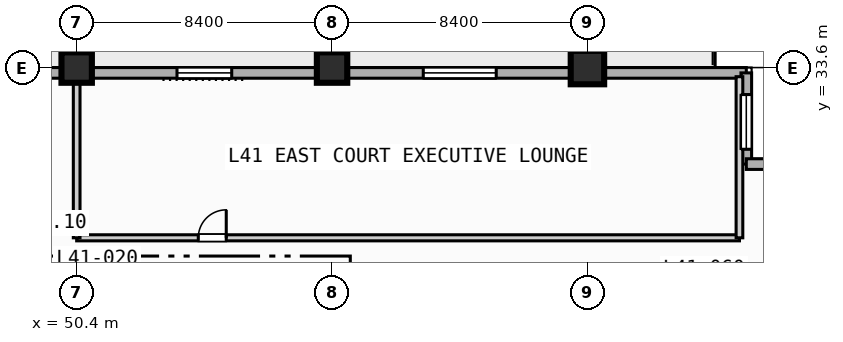
"""IFC4 building model, lengths in metres.
Left out: names, types, materials, properties, quantities, classifications, styles, units other than length and angle.
Written with IfcOpenShell. Run it as: python <this file> out.ifc"""

import sys

from ifc_helpers import new_model, si_unit, direction, frame, frame_2d, origin, origin_2d, place, context, subcontext, project, spatial, rectangle, extrude, element, fill, save


model = new_model("IFC4")
c1 = context("Model", 3, precision=1e-05, world=origin(), true_north=direction((0.0, 1.0)))
c2 = subcontext(c1, "Body", "Model", "MODEL_VIEW")
j1 = project(units=[si_unit("LENGTHUNIT", "METRE"), si_unit("PLANEANGLEUNIT", "RADIAN")], contexts=[c1])
p1 = place(None, origin())
s1 = spatial("IfcSite", under=j1, at=p1, CompositionType="ELEMENT")
p2 = place(p1, origin())
s2 = spatial("IfcBuilding", under=s1, at=p2, CompositionType="ELEMENT")
p3 = place(p2, frame((0.0, 0.0, 171.7)))
s3 = spatial("IfcBuildingStorey", under=s2, at=p3, CompositionType="ELEMENT", Elevation=171.7)
for number, where, z_axis, x_axis in (
    (1, (50.4, 33.6, 0.0), (0.0, 0.0, 1.0), (1.0, 0.0, 0.0)),
    (2, (58.8, 33.6, 0.0), (0.0, 0.0, 1.0), (1.0, 0.0, 0.0)),
):
    element("IfcColumn", number, at=place(p3, frame(where, z_axis=z_axis, x_axis=x_axis)), inside=s3, PredefinedType="COLUMN", context=c2, shape_type="SweptSolid", body=[
        extrude(rectangle(XDim=1.0, YDim=1.0, at=origin_2d()), origin(), (0.0, 0.0, 1.0), 3.7),
    ])
p4 = place(p3, frame((67.2, 33.6, 0.0), z_axis=(0.0, 0.0, 1.0), x_axis=(1.0, 0.0, 0.0)))
e3 = element("IfcColumn", 3, at=p4, inside=s3, PredefinedType="COLUMN", context=c2, shape_type="SweptSolid", body=[
    extrude(rectangle(XDim=1.1, YDim=1.1, at=origin_2d()), origin(), (0.0, 0.0, 1.0), 3.7),
])
p5 = place(p3, frame((33.425, 33.425, 0.0), z_axis=(0.0, 0.0, 1.0), x_axis=(1.0, 0.0, 0.0)))
e4 = element("IfcWall", 4, at=p5, inside=s3, PredefinedType="STANDARD", context=c2, shape_type="SweptSolid", body=[
    extrude(rectangle(XDim=39.0, YDim=0.35, at=frame_2d((19.5, 0.0))), origin(), (0.0, 0.0, 1.0), 3.47),
])
p6 = place(p5, frame((12.075, 0.0, 0.0)))
e5 = element("IfcOpeningElement", 5, at=p6, cuts=e4, PredefinedType="OPENING", context=c2, shape_type="SweptSolid", body=[
    extrude(rectangle(XDim=1.4, YDim=2.2, at=frame_2d((0.7, 1.1))), frame((0.0, 0.185, 0.0), z_axis=(0.0, -1.0, 0.0), x_axis=(1.0, 0.0, 0.0)), (0.0, 0.0, 1.0), 0.37),
])
p7 = place(p5, frame((20.275, 0.0, 0.85)))
e6 = element("IfcOpeningElement", 6, at=p7, cuts=e4, PredefinedType="OPENING", context=c2, shape_type="SweptSolid", body=[
    extrude(rectangle(XDim=1.8, YDim=1.8, at=frame_2d((0.9, 0.9))), frame((0.0, 0.185, 0.0), z_axis=(0.0, -1.0, 0.0), x_axis=(1.0, 0.0, 0.0)), (0.0, 0.0, 1.0), 0.37),
])
p8 = place(p5, frame((28.375, 0.0, 0.85)))
e7 = element("IfcOpeningElement", 7, at=p8, cuts=e4, PredefinedType="OPENING", context=c2, shape_type="SweptSolid", body=[
    extrude(rectangle(XDim=2.4, YDim=1.95, at=frame_2d((1.2, 0.975))), frame((0.0, 0.185, 0.0), z_axis=(0.0, -1.0, 0.0), x_axis=(1.0, 0.0, 0.0)), (0.0, 0.0, 1.0), 0.37),
])
p9 = place(p3, frame((72.425, 33.425, 0.0), z_axis=(0.0, 0.0, 1.0), x_axis=(0.0, -1.0, 0.0)))
e8 = element("IfcWall", 8, at=p9, inside=s3, PredefinedType="STANDARD", context=c2, shape_type="SweptSolid", body=[
    extrude(rectangle(XDim=3.0, YDim=0.35, at=frame_2d((1.5, 0.0))), origin(), (0.0, 0.0, 1.0), 3.47),
])
p10 = place(p9, frame((0.712, 0.0, 0.85)))
e9 = element("IfcOpeningElement", 9, at=p10, cuts=e8, PredefinedType="OPENING", context=c2, shape_type="SweptSolid", body=[
    extrude(rectangle(XDim=1.8, YDim=1.8, at=frame_2d((0.9, 0.9))), frame((0.0, 0.185, 0.0), z_axis=(0.0, -1.0, 0.0), x_axis=(1.0, 0.0, 0.0)), (0.0, 0.0, 1.0), 0.37),
])
p11 = place(p3, frame((72.425, 30.425, 0.0), z_axis=(0.0, 0.0, 1.0), x_axis=(1.0, 0.0, 0.0)))
e10 = element("IfcWall", 10, at=p11, inside=s3, PredefinedType="STANDARD", context=c2, shape_type="SweptSolid", body=[
    extrude(rectangle(XDim=3.0, YDim=0.35, at=frame_2d((1.5, 0.0))), origin(), (0.0, 0.0, 1.0), 3.47),
])
p12 = place(p3, frame((50.4, 28.0, 0.0), z_axis=(0.0, 0.0, 1.0), x_axis=(1.0, 0.0, 0.0)))
e11 = element("IfcWall", 11, at=p12, inside=s3, PredefinedType="PARTITIONING", context=c2, shape_type="SweptSolid", body=[
    extrude(rectangle(XDim=21.8, YDim=0.2, at=frame_2d((10.9, 0.0))), origin(), (0.0, 0.0, 1.0), 3.47),
])
p13 = place(p12, frame((4.0, 0.0, 0.0)))
e12 = element("IfcOpeningElement", 12, at=p13, cuts=e11, PredefinedType="OPENING", context=c2, shape_type="SweptSolid", body=[
    extrude(rectangle(XDim=0.92, YDim=2.1, at=frame_2d((0.46, 1.05))), frame((0.0, 0.11, 0.0), z_axis=(0.0, -1.0, 0.0), x_axis=(1.0, 0.0, 0.0)), (0.0, 0.0, 1.0), 0.22),
])
p14 = place(p3, frame((50.4, 28.0, 0.0), z_axis=(0.0, 0.0, 1.0), x_axis=(0.0, 1.0, 0.0)))
e13 = element("IfcWall", 13, at=p14, inside=s3, PredefinedType="PARTITIONING", context=c2, shape_type="SweptSolid", body=[
    extrude(rectangle(XDim=5.3, YDim=0.22, at=frame_2d((2.65, 0.0))), origin(), (0.0, 0.0, 1.0), 3.007),
])
p15 = place(p3, frame((72.2, 28.0, 0.0), z_axis=(0.0, 0.0, 1.0), x_axis=(0.0, 1.0, 0.0)))
e14 = element("IfcWall", 14, at=p15, inside=s3, PredefinedType="PARTITIONING", context=c2, shape_type="SweptSolid", body=[
    extrude(rectangle(XDim=5.3, YDim=0.22, at=frame_2d((2.65, 0.0))), origin(), (0.0, 0.0, 1.0), 3.47),
])
p16 = place(p7, origin())
e15 = element("IfcWindow", 15, at=p16, inside=s3, PartitioningType="SINGLE_PANEL", PredefinedType="WINDOW", context=c2, shape_type="SweptSolid", body=[
    extrude(rectangle(XDim=1.8, YDim=1.8, at=frame_2d((0.9, 0.9))), frame((0.0, 0.03, 0.0), z_axis=(0.0, -1.0, 0.0), x_axis=(1.0, 0.0, 0.0)), (0.0, 0.0, 1.0), 0.06),
])
fill(e6, e15)
p17 = place(p8, origin())
e16 = element("IfcWindow", 16, at=p17, inside=s3, PartitioningType="SINGLE_PANEL", PredefinedType="WINDOW", context=c2, shape_type="SweptSolid", body=[
    extrude(rectangle(XDim=2.4, YDim=1.95, at=frame_2d((1.2, 0.975))), frame((0.0, 0.03, 0.0), z_axis=(0.0, -1.0, 0.0), x_axis=(1.0, 0.0, 0.0)), (0.0, 0.0, 1.0), 0.06),
])
fill(e7, e16)
p18 = place(p10, origin())
e17 = element("IfcWindow", 17, at=p18, inside=s3, PartitioningType="SINGLE_PANEL", PredefinedType="WINDOW", context=c2, shape_type="SweptSolid", body=[
    extrude(rectangle(XDim=1.8, YDim=1.8, at=frame_2d((0.9, 0.9))), frame((0.0, 0.03, 0.0), z_axis=(0.0, -1.0, 0.0), x_axis=(1.0, 0.0, 0.0)), (0.0, 0.0, 1.0), 0.06),
])
fill(e9, e17)
p19 = place(p13, origin())
e18 = element("IfcDoor", 18, at=p19, inside=s3, OperationType="SINGLE_SWING_RIGHT", PredefinedType="DOOR", context=c2, shape_type="SweptSolid", body=[
    extrude(rectangle(XDim=0.92, YDim=2.1, at=frame_2d((0.46, 1.05))), frame((0.0, 0.025, 0.0), z_axis=(0.0, -1.0, 0.0), x_axis=(1.0, 0.0, 0.0)), (0.0, 0.0, 1.0), 0.05),
])
fill(e12, e18)
save(model, sys.argv[1])
